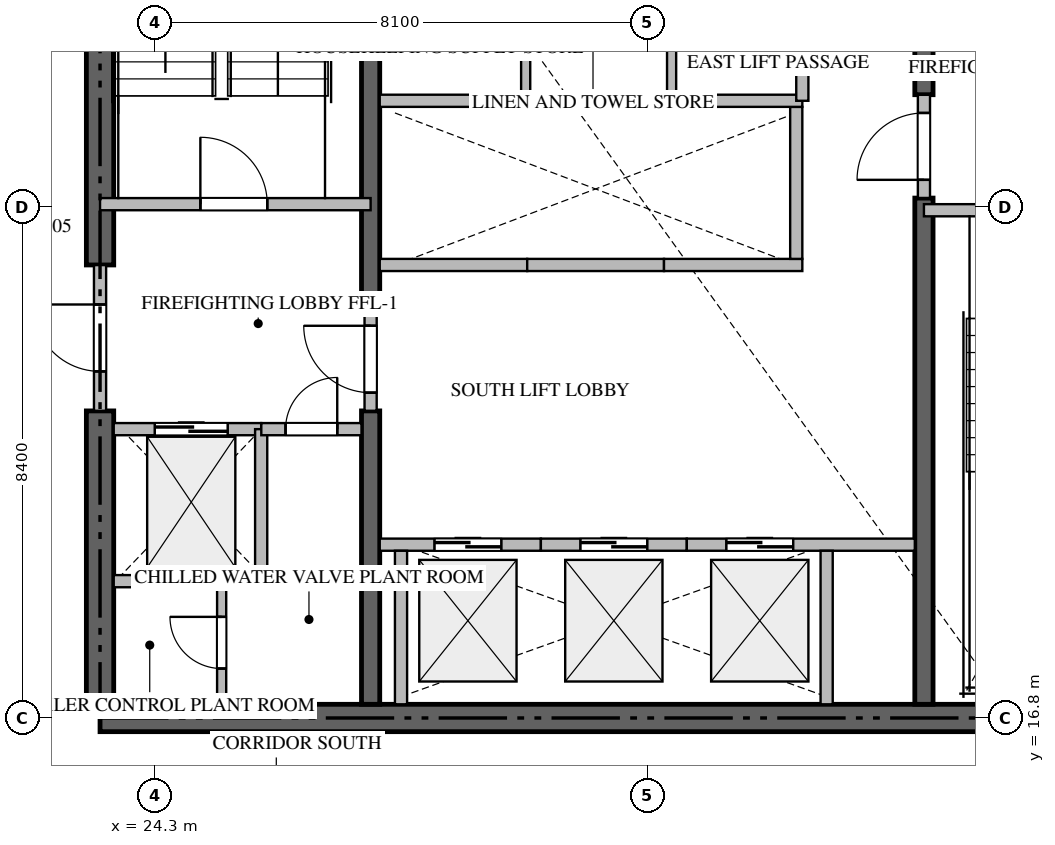
"""IFC4 building model, lengths in metres.
Left out: names, types, materials, properties, quantities, classifications, styles, units other than length and angle.
Written with IfcOpenShell. Run it as: python <this file> out.ifc"""

import sys

from ifc_helpers import new_model, si_unit, direction, frame, frame_2d, origin, place, context, subcontext, project, spatial, rectangle, extrude, source, transform, mapped, element, fill, save


model = new_model("IFC4")
c1 = context("Model", 3, precision=1e-05, world=origin(), true_north=direction((0.0, 1.0)))
c2 = subcontext(c1, "Body", "Model", "MODEL_VIEW")
j1 = project(units=[si_unit("LENGTHUNIT", "METRE"), si_unit("PLANEANGLEUNIT", "RADIAN")], contexts=[c1])
p1 = place(None, origin())
s1 = spatial("IfcSite", under=j1, at=p1, CompositionType="ELEMENT")
p2 = place(p1, origin())
s2 = spatial("IfcBuilding", under=s1, at=p2, CompositionType="ELEMENT")
p3 = place(p2, frame((0.0, 0.0, 41.7)))
s3 = spatial("IfcBuildingStorey", under=s2, at=p3, CompositionType="ELEMENT", Elevation=41.7)
p4 = place(p3, frame((23.4, 16.8, -0.26), z_axis=(0.0, 0.0, 1.0), x_axis=(1.0, 0.0, 0.0)))
e1 = element("IfcWall", 1, at=p4, inside=s3, PredefinedType="SHEAR", context=c2, shape_type="SweptSolid", body=[
    extrude(rectangle(XDim=18.0, YDim=0.45, at=frame_2d((9.0, 0.0))), origin(), (0.0, 0.0, 1.0), 3.748),
])
p5 = place(p3, frame((23.4, 17.025, -0.26), z_axis=(0.0, 0.0, 1.0), x_axis=(0.0, 1.0, 0.0)))
e2 = element("IfcWall", 2, at=p5, inside=s3, PredefinedType="SHEAR", context=c2, shape_type="SweptSolid", body=[
    extrude(rectangle(XDim=4.825, YDim=0.45, at=frame_2d((2.413, 0.0))), origin(), (0.0, 0.0, 1.0), 3.748),
])
p6 = place(p3, frame((23.4, 24.25, -0.26), z_axis=(0.0, 0.0, 1.0), x_axis=(0.0, 1.0, 0.0)))
e3 = element("IfcWall", 3, at=p6, inside=s3, PredefinedType="SHEAR", context=c2, shape_type="SweptSolid", body=[
    extrude(rectangle(XDim=9.125, YDim=0.45, at=frame_2d((4.562, 0.0))), origin(), (0.0, 0.0, 1.0), 3.748),
])
p7 = place(p3, frame((27.85, 17.025, -0.26), z_axis=(0.0, 0.0, 1.0), x_axis=(0.0, 1.0, 0.0)))
e4 = element("IfcWall", 4, at=p7, inside=s3, PredefinedType="SHEAR", context=c2, shape_type="SweptSolid", body=[
    extrude(rectangle(XDim=4.825, YDim=0.3, at=frame_2d((2.413, 0.0))), origin(), (0.0, 0.0, 1.0), 3.748),
])
p8 = place(p3, frame((27.85, 23.55, -0.26), z_axis=(0.0, 0.0, 1.0), x_axis=(0.0, 1.0, 0.0)))
e5 = element("IfcWall", 5, at=p8, inside=s3, PredefinedType="SHEAR", context=c2, shape_type="SweptSolid", body=[
    extrude(rectangle(XDim=9.825, YDim=0.3, at=frame_2d((4.913, 0.0))), origin(), (0.0, 0.0, 1.0), 3.748),
])
p9 = place(p3, frame((36.95, 17.025, -0.26), z_axis=(0.0, 0.0, 1.0), x_axis=(0.0, 1.0, 0.0)))
e6 = element("IfcWall", 6, at=p9, inside=s3, PredefinedType="SHEAR", context=c2, shape_type="SweptSolid", body=[
    extrude(rectangle(XDim=8.325, YDim=0.3, at=frame_2d((4.163, 0.0))), origin(), (0.0, 0.0, 1.0), 3.748),
])
p10 = place(p3, frame((36.95, 27.05, -0.26), z_axis=(0.0, 0.0, 1.0), x_axis=(0.0, 1.0, 0.0)))
e7 = element("IfcWall", 7, at=p10, inside=s3, PredefinedType="SHEAR", context=c2, shape_type="SweptSolid", body=[
    extrude(rectangle(XDim=6.325, YDim=0.3, at=frame_2d((3.163, 0.0))), origin(), (0.0, 0.0, 1.0), 3.748),
])
p11 = place(p3, frame((23.4, 25.25, 0.0), z_axis=(0.0, 0.0, 1.0), x_axis=(1.0, 0.0, 0.0)))
e8 = element("IfcWall", 8, at=p11, inside=s3, PredefinedType="STANDARD", context=c2, shape_type="SweptSolid", body=[
    extrude(rectangle(XDim=4.45, YDim=0.2, at=frame_2d((2.225, 0.0))), origin(), (0.0, 0.0, 1.0), 3.49),
])
p12 = place(p11, frame((1.65, 0.0, 0.0)))
e9 = element("IfcOpeningElement", 9, at=p12, cuts=e8, PredefinedType="OPENING", context=c2, shape_type="SweptSolid", body=[
    extrude(rectangle(XDim=1.1, YDim=2.15, at=frame_2d((0.55, 1.075))), frame((0.0, 0.11, 0.0), z_axis=(0.0, -1.0, 0.0), x_axis=(1.0, 0.0, 0.0)), (0.0, 0.0, 1.0), 0.22),
])
p13 = place(p3, frame((36.95, 25.15, 0.0), z_axis=(0.0, 0.0, 1.0), x_axis=(1.0, 0.0, 0.0)))
e10 = element("IfcWall", 10, at=p13, inside=s3, PredefinedType="STANDARD", context=c2, shape_type="SweptSolid", body=[
    extrude(rectangle(XDim=4.45, YDim=0.2, at=frame_2d((2.225, 0.0))), origin(), (0.0, 0.0, 1.0), 3.49),
])
p14 = place(p13, frame((1.65, 0.0, 0.0)))
e11 = element("IfcOpeningElement", 11, at=p14, cuts=e10, PredefinedType="OPENING", context=c2, shape_type="SweptSolid", body=[
    extrude(rectangle(XDim=1.1, YDim=2.15, at=frame_2d((0.55, 1.075))), frame((0.0, 0.11, 0.0), z_axis=(0.0, -1.0, 0.0), x_axis=(1.0, 0.0, 0.0)), (0.0, 0.0, 1.0), 0.22),
])
p15 = place(p3, frame((23.625, 21.55, 0.0), z_axis=(0.0, 0.0, 1.0), x_axis=(1.0, 0.0, 0.0)))
e12 = element("IfcWall", 12, at=p15, inside=s3, PredefinedType="STANDARD", context=c2, shape_type="SweptSolid", body=[
    extrude(rectangle(XDim=2.425, YDim=0.2, at=frame_2d((1.212, 0.0))), origin(), (0.0, 0.0, 1.0), 3.49),
])
p16 = place(p15, frame((0.675, 0.0, 0.0)))
e13 = element("IfcOpeningElement", 13, at=p16, cuts=e12, PredefinedType="OPENING", context=c2, shape_type="SweptSolid", body=[
    extrude(rectangle(XDim=1.2, YDim=2.2, at=frame_2d((0.6, 1.1))), frame((0.0, 0.11, 0.0), z_axis=(0.0, -1.0, 0.0), x_axis=(1.0, 0.0, 0.0)), (0.0, 0.0, 1.0), 0.22),
])
p17 = place(p3, frame((28.0, 19.65, 0.0), z_axis=(0.0, 0.0, 1.0), x_axis=(1.0, 0.0, 0.0)))
e14 = element("IfcWall", 14, at=p17, inside=s3, PredefinedType="STANDARD", context=c2, shape_type="SweptSolid", body=[
    extrude(rectangle(XDim=2.65, YDim=0.2, at=frame_2d((1.325, 0.0))), origin(), (0.0, 0.0, 1.0), 3.49),
])
p18 = place(p17, frame((0.9, 0.0, 0.0)))
e15 = element("IfcOpeningElement", 15, at=p18, cuts=e14, PredefinedType="OPENING", context=c2, shape_type="SweptSolid", body=[
    extrude(rectangle(XDim=1.1, YDim=2.2, at=frame_2d((0.55, 1.1))), frame((0.0, 0.11, 0.0), z_axis=(0.0, -1.0, 0.0), x_axis=(1.0, 0.0, 0.0)), (0.0, 0.0, 1.0), 0.22),
])
p19 = place(p3, frame((28.35, 17.025, 0.0), z_axis=(0.0, 0.0, 1.0), x_axis=(0.0, 1.0, 0.0)))
e16 = element("IfcWall", 16, at=p19, inside=s3, PredefinedType="STANDARD", context=c2, shape_type="SweptSolid", body=[
    extrude(rectangle(XDim=2.525, YDim=0.2, at=frame_2d((1.263, 0.0))), origin(), (0.0, 0.0, 1.0), 3.49),
])
p20 = place(p3, frame((30.65, 19.65, 0.0), z_axis=(0.0, 0.0, 1.0), x_axis=(1.0, 0.0, 0.0)))
e17 = element("IfcWall", 17, at=p20, inside=s3, PredefinedType="STANDARD", context=c2, shape_type="SweptSolid", body=[
    extrude(rectangle(XDim=2.4, YDim=0.2, at=frame_2d((1.2, 0.0))), origin(), (0.0, 0.0, 1.0), 3.49),
])
p21 = place(p20, frame((0.65, 0.0, 0.0)))
e18 = element("IfcOpeningElement", 18, at=p21, cuts=e17, PredefinedType="OPENING", context=c2, shape_type="SweptSolid", body=[
    extrude(rectangle(XDim=1.1, YDim=2.2, at=frame_2d((0.55, 1.1))), frame((0.0, 0.11, 0.0), z_axis=(0.0, -1.0, 0.0), x_axis=(1.0, 0.0, 0.0)), (0.0, 0.0, 1.0), 0.22),
])
p22 = place(p3, frame((33.05, 19.65, 0.0), z_axis=(0.0, 0.0, 1.0), x_axis=(1.0, 0.0, 0.0)))
e19 = element("IfcWall", 19, at=p22, inside=s3, PredefinedType="STANDARD", context=c2, shape_type="SweptSolid", body=[
    extrude(rectangle(XDim=3.75, YDim=0.2, at=frame_2d((1.875, 0.0))), origin(), (0.0, 0.0, 1.0), 3.49),
])
p23 = place(p22, frame((0.65, 0.0, 0.0)))
e20 = element("IfcOpeningElement", 20, at=p23, cuts=e19, PredefinedType="OPENING", context=c2, shape_type="SweptSolid", body=[
    extrude(rectangle(XDim=1.1, YDim=2.2, at=frame_2d((0.55, 1.1))), frame((0.0, 0.11, 0.0), z_axis=(0.0, -1.0, 0.0), x_axis=(1.0, 0.0, 0.0)), (0.0, 0.0, 1.0), 0.22),
])
p24 = place(p3, frame((35.35, 17.025, 0.0), z_axis=(0.0, 0.0, 1.0), x_axis=(0.0, 1.0, 0.0)))
e21 = element("IfcWall", 21, at=p24, inside=s3, PredefinedType="STANDARD", context=c2, shape_type="SweptSolid", body=[
    extrude(rectangle(XDim=2.525, YDim=0.2, at=frame_2d((1.263, 0.0))), origin(), (0.0, 0.0, 1.0), 3.49),
])
p25 = place(p3, frame((28.0, 24.25, 0.0), z_axis=(0.0, 0.0, 1.0), x_axis=(1.0, 0.0, 0.0)))
e22 = element("IfcWall", 22, at=p25, inside=s3, PredefinedType="STANDARD", context=c2, shape_type="SweptSolid", body=[
    extrude(rectangle(XDim=2.425, YDim=0.2, at=frame_2d((1.212, 0.0))), origin(), (0.0, 0.0, 1.0), 3.49),
])
p26 = place(p3, frame((30.425, 24.25, 0.0), z_axis=(0.0, 0.0, 1.0), x_axis=(1.0, 0.0, 0.0)))
e23 = element("IfcWall", 23, at=p26, inside=s3, PredefinedType="STANDARD", context=c2, shape_type="SweptSolid", body=[
    extrude(rectangle(XDim=2.25, YDim=0.2, at=frame_2d((1.125, 0.0))), origin(), (0.0, 0.0, 1.0), 3.49),
])
p27 = place(p3, frame((32.675, 24.25, 0.0), z_axis=(0.0, 0.0, 1.0), x_axis=(1.0, 0.0, 0.0)))
e24 = element("IfcWall", 24, at=p27, inside=s3, PredefinedType="STANDARD", context=c2, shape_type="SweptSolid", body=[
    extrude(rectangle(XDim=2.275, YDim=0.2, at=frame_2d((1.137, 0.0))), origin(), (0.0, 0.0, 1.0), 3.49),
])
for number, where, z_axis, x_axis in (
    (25, (34.85, 24.35, 0.0), (0.0, 0.0, 1.0), (0.0, 1.0, 0.0)),
    (26, (26.05, 19.05, 0.0), (0.0, 0.0, 1.0), (0.0, 1.0, 0.0)),
):
    element("IfcWall", number, at=place(p3, frame(where, z_axis=z_axis, x_axis=x_axis)), inside=s3, PredefinedType="STANDARD", context=c2, shape_type="SweptSolid", body=[
        extrude(rectangle(XDim=2.5, YDim=0.2, at=frame_2d((1.25, 0.0))), origin(), (0.0, 0.0, 1.0), 3.49),
    ])
p28 = place(p3, frame((23.625, 19.05, 0.0), z_axis=(0.0, 0.0, 1.0), x_axis=(1.0, 0.0, 0.0)))
e27 = element("IfcWall", 27, at=p28, inside=s3, PredefinedType="STANDARD", context=c2, shape_type="SweptSolid", body=[
    extrude(rectangle(XDim=2.425, YDim=0.2, at=frame_2d((1.212, 0.0))), origin(), (0.0, 0.0, 1.0), 3.49),
])
p29 = place(p3, frame((26.052, 21.55, 0.0), z_axis=(0.0, 0.0, 1.0), x_axis=(1.0, 0.0, 0.0)))
e28 = element("IfcWall", 28, at=p29, inside=s3, PredefinedType="STANDARD", context=c2, shape_type="SweptSolid", body=[
    extrude(rectangle(XDim=1.648, YDim=0.2, at=frame_2d((0.824, 0.0))), origin(), (0.0, 0.0, 1.0), 3.49),
])
p30 = place(p29, frame((0.399, 0.0, 0.0)))
e29 = element("IfcOpeningElement", 29, at=p30, cuts=e28, PredefinedType="OPENING", context=c2, shape_type="SweptSolid", body=[
    extrude(rectangle(XDim=0.85, YDim=2.1, at=frame_2d((0.425, 1.05))), frame((0.0, 0.11, 0.0), z_axis=(0.0, -1.0, 0.0), x_axis=(1.0, 0.0, 0.0)), (0.0, 0.0, 1.0), 0.22),
])
p31 = place(p3, frame((23.4, 21.852, 0.0), z_axis=(0.0, 0.0, 1.0), x_axis=(0.0, 1.0, 0.0)))
e30 = element("IfcWall", 30, at=p31, inside=s3, PredefinedType="STANDARD", context=c2, shape_type="SweptSolid", body=[
    extrude(rectangle(XDim=2.396, YDim=0.2, at=frame_2d((1.198, 0.0))), origin(), (0.0, 0.0, 1.0), 3.49),
])
p32 = place(p31, frame((0.648, 0.0, 0.0)))
e31 = element("IfcOpeningElement", 31, at=p32, cuts=e30, PredefinedType="OPENING", context=c2, shape_type="SweptSolid", body=[
    extrude(rectangle(XDim=1.1, YDim=2.15, at=frame_2d((0.55, 1.075))), frame((0.0, 0.11, 0.0), z_axis=(0.0, -1.0, 0.0), x_axis=(1.0, 0.0, 0.0)), (0.0, 0.0, 1.0), 0.22),
])
p33 = place(p3, frame((27.85, 21.852, 0.0), z_axis=(0.0, 0.0, 1.0), x_axis=(0.0, 1.0, 0.0)))
e32 = element("IfcWall", 32, at=p33, inside=s3, PredefinedType="STANDARD", context=c2, shape_type="SweptSolid", body=[
    extrude(rectangle(XDim=1.696, YDim=0.2, at=frame_2d((0.848, 0.0))), origin(), (0.0, 0.0, 1.0), 3.49),
])
p34 = place(p33, frame((0.298, 0.0, 0.0)))
e33 = element("IfcOpeningElement", 33, at=p34, cuts=e32, PredefinedType="OPENING", context=c2, shape_type="SweptSolid", body=[
    extrude(rectangle(XDim=1.1, YDim=2.15, at=frame_2d((0.55, 1.075))), frame((0.0, 0.11, 0.0), z_axis=(0.0, -1.0, 0.0), x_axis=(1.0, 0.0, 0.0)), (0.0, 0.0, 1.0), 0.22),
])
p35 = place(p3, frame((36.95, 25.352, 0.0), z_axis=(0.0, 0.0, 1.0), x_axis=(0.0, 1.0, 0.0)))
e34 = element("IfcWall", 34, at=p35, inside=s3, PredefinedType="STANDARD", context=c2, shape_type="SweptSolid", body=[
    extrude(rectangle(XDim=1.696, YDim=0.2, at=frame_2d((0.848, 0.0))), origin(), (0.0, 0.0, 1.0), 3.49),
])
p36 = place(p35, frame((0.298, 0.0, 0.0)))
e35 = element("IfcOpeningElement", 35, at=p36, cuts=e34, PredefinedType="OPENING", context=c2, shape_type="SweptSolid", body=[
    extrude(rectangle(XDim=1.1, YDim=2.15, at=frame_2d((0.55, 1.075))), frame((0.0, 0.11, 0.0), z_axis=(0.0, -1.0, 0.0), x_axis=(1.0, 0.0, 0.0)), (0.0, 0.0, 1.0), 0.22),
])
p37 = place(p3, frame((28.0, 26.95, 0.0), z_axis=(0.0, 0.0, 1.0), x_axis=(1.0, 0.0, 0.0)))
e36 = element("IfcWall", 36, at=p37, inside=s3, PredefinedType="STANDARD", context=c2, shape_type="SweptSolid", body=[
    extrude(rectangle(XDim=6.95, YDim=0.2, at=frame_2d((3.475, 0.0))), origin(), (0.0, 0.0, 1.0), 3.49),
])
p38 = place(p3, frame((25.4, 17.025, 0.0), z_axis=(0.0, 0.0, 1.0), x_axis=(0.0, 1.0, 0.0)))
e37 = element("IfcWall", 37, at=p38, inside=s3, PredefinedType="PARTITIONING", context=c2, shape_type="SweptSolid", body=[
    extrude(rectangle(XDim=2.025, YDim=0.15, at=frame_2d((1.013, 0.0))), origin(), (0.0, 0.0, 1.0), 3.49),
])
p39 = place(p38, frame((0.588, 0.0, 0.0)))
e38 = element("IfcOpeningElement", 38, at=p39, cuts=e37, PredefinedType="OPENING", context=c2, shape_type="SweptSolid", body=[
    extrude(rectangle(XDim=0.85, YDim=2.1, at=frame_2d((0.425, 1.05))), frame((0.0, 0.085, 0.0), z_axis=(0.0, -1.0, 0.0), x_axis=(1.0, 0.0, 0.0)), (0.0, 0.0, 1.0), 0.17),
])
p40 = place(p3, frame((34.95, 26.95, 0.0), z_axis=(0.0, 0.0, 1.0), x_axis=(0.0, 1.0, 0.0)))
e39 = element("IfcWall", 39, at=p40, inside=s3, PredefinedType="STANDARD", context=c2, shape_type="SweptSolid", body=[
    extrude(rectangle(XDim=3.6, YDim=0.2, at=frame_2d((1.8, 0.0))), origin(), (0.0, 0.0, 1.0), 3.49),
])
p41 = place(p40, frame((1.35, 0.0, 0.0)))
e40 = element("IfcOpeningElement", 40, at=p41, cuts=e39, PredefinedType="OPENING", context=c2, shape_type="SweptSolid", body=[
    extrude(rectangle(XDim=0.9, YDim=2.1, at=frame_2d((0.45, 1.05))), frame((0.0, 0.11, 0.0), z_axis=(0.0, -1.0, 0.0), x_axis=(1.0, 0.0, 0.0)), (0.0, 0.0, 1.0), 0.22),
])
p42 = place(p3, frame((32.8, 26.95, 0.0), z_axis=(0.0, 0.0, 1.0), x_axis=(0.0, 1.0, 0.0)))
e41 = element("IfcWall", 41, at=p42, inside=s3, PredefinedType="PARTITIONING", context=c2, shape_type="SweptSolid", body=[
    extrude(rectangle(XDim=3.6, YDim=0.15, at=frame_2d((1.8, 0.0))), origin(), (0.0, 0.0, 1.0), 3.49),
])
p43 = place(p42, frame((1.375, 0.0, 0.0)))
e42 = element("IfcOpeningElement", 42, at=p43, cuts=e41, PredefinedType="OPENING", context=c2, shape_type="SweptSolid", body=[
    extrude(rectangle(XDim=0.85, YDim=2.1, at=frame_2d((0.425, 1.05))), frame((0.0, 0.085, 0.0), z_axis=(0.0, -1.0, 0.0), x_axis=(1.0, 0.0, 0.0)), (0.0, 0.0, 1.0), 0.17),
])
p44 = place(p3, frame((30.4, 26.95, 0.0), z_axis=(0.0, 0.0, 1.0), x_axis=(0.0, 1.0, 0.0)))
e43 = element("IfcWall", 43, at=p44, inside=s3, PredefinedType="PARTITIONING", context=c2, shape_type="SweptSolid", body=[
    extrude(rectangle(XDim=3.6, YDim=0.15, at=frame_2d((1.8, 0.0))), origin(), (0.0, 0.0, 1.0), 3.49),
])
p45 = place(p44, frame((1.375, 0.0, 0.0)))
e44 = element("IfcOpeningElement", 44, at=p45, cuts=e43, PredefinedType="OPENING", context=c2, shape_type="SweptSolid", body=[
    extrude(rectangle(XDim=0.85, YDim=2.1, at=frame_2d((0.425, 1.05))), frame((0.0, 0.085, 0.0), z_axis=(0.0, -1.0, 0.0), x_axis=(1.0, 0.0, 0.0)), (0.0, 0.0, 1.0), 0.17),
])
m1 = source(origin(), c2, "Body", "SweptSolid", [
    extrude(rectangle(XDim=1.1, YDim=2.15, at=frame_2d((0.55, 1.075))), frame((0.0, 0.025, 0.0), z_axis=(0.0, -1.0, 0.0), x_axis=(1.0, 0.0, 0.0)), (0.0, 0.0, 1.0), 0.05),
])
p46 = place(p12, origin())
e45 = element("IfcDoor", 45, at=p46, inside=s3, OperationType="SINGLE_SWING_LEFT", PredefinedType="DOOR", context=c2, shape_type="MappedRepresentation", body=[
    mapped(m1, transform((0.0, 0.0, 0.0), scale=1.0)),
])
fill(e9, e45)
m2 = source(origin(), c2, "Body", "SweptSolid", [
    extrude(rectangle(XDim=1.2, YDim=2.2, at=frame_2d((0.6, 1.1))), frame((0.0, 0.025, 0.0), z_axis=(0.0, -1.0, 0.0), x_axis=(1.0, 0.0, 0.0)), (0.0, 0.0, 1.0), 0.05),
])
p47 = place(p16, origin())
e46 = element("IfcDoor", 46, at=p47, inside=s3, OperationType="DOUBLE_DOOR_SLIDING", PredefinedType="DOOR", context=c2, shape_type="MappedRepresentation", body=[
    mapped(m2, transform((0.0, 0.0, 0.0), scale=1.0)),
])
fill(e13, e46)
m3 = source(origin(), c2, "Body", "SweptSolid", [
    extrude(rectangle(XDim=1.1, YDim=2.2, at=frame_2d((0.55, 1.1))), frame((0.0, 0.025, 0.0), z_axis=(0.0, -1.0, 0.0), x_axis=(1.0, 0.0, 0.0)), (0.0, 0.0, 1.0), 0.05),
])
p48 = place(p18, origin())
e47 = element("IfcDoor", 47, at=p48, inside=s3, OperationType="DOUBLE_DOOR_SLIDING", PredefinedType="DOOR", context=c2, shape_type="MappedRepresentation", body=[
    mapped(m3, transform((0.0, 0.0, 0.0), scale=1.0)),
])
fill(e15, e47)
p49 = place(p21, origin())
e48 = element("IfcDoor", 48, at=p49, inside=s3, OperationType="DOUBLE_DOOR_SLIDING", PredefinedType="DOOR", context=c2, shape_type="MappedRepresentation", body=[
    mapped(m3, transform((0.0, 0.0, 0.0), scale=1.0)),
])
fill(e18, e48)
p50 = place(p23, origin())
e49 = element("IfcDoor", 49, at=p50, inside=s3, OperationType="DOUBLE_DOOR_SLIDING", PredefinedType="DOOR", context=c2, shape_type="MappedRepresentation", body=[
    mapped(m3, transform((0.0, 0.0, 0.0), scale=1.0)),
])
fill(e20, e49)
m4 = source(origin(), c2, "Body", "SweptSolid", [
    extrude(rectangle(XDim=0.85, YDim=2.1, at=frame_2d((0.425, 1.05))), frame((0.0, 0.025, 0.0), z_axis=(0.0, -1.0, 0.0), x_axis=(1.0, 0.0, 0.0)), (0.0, 0.0, 1.0), 0.05),
])
p51 = place(p30, origin())
e50 = element("IfcDoor", 50, at=p51, inside=s3, OperationType="SINGLE_SWING_RIGHT", PredefinedType="DOOR", context=c2, shape_type="MappedRepresentation", body=[
    mapped(m4, transform((0.0, 0.0, 0.0), scale=1.0)),
])
fill(e29, e50)
p52 = place(p32, origin())
e51 = element("IfcDoor", 51, at=p52, inside=s3, OperationType="SINGLE_SWING_RIGHT", PredefinedType="DOOR", context=c2, shape_type="MappedRepresentation", body=[
    mapped(m1, transform((0.0, 0.0, 0.0), scale=1.0)),
])
fill(e31, e51)
p53 = place(p34, origin())
e52 = element("IfcDoor", 52, at=p53, inside=s3, OperationType="SINGLE_SWING_RIGHT", PredefinedType="DOOR", context=c2, shape_type="MappedRepresentation", body=[
    mapped(m1, transform((0.0, 0.0, 0.0), scale=1.0)),
])
fill(e33, e52)
p54 = place(p36, origin())
e53 = element("IfcDoor", 53, at=p54, inside=s3, OperationType="SINGLE_SWING_LEFT", PredefinedType="DOOR", context=c2, shape_type="MappedRepresentation", body=[
    mapped(m1, transform((0.0, 0.0, 0.0), scale=1.0)),
])
fill(e35, e53)
p55 = place(p39, origin())
e54 = element("IfcDoor", 54, at=p55, inside=s3, OperationType="SINGLE_SWING_RIGHT", PredefinedType="DOOR", context=c2, shape_type="MappedRepresentation", body=[
    mapped(m4, transform((0.0, 0.0, 0.0), scale=1.0)),
])
fill(e38, e54)
save(model, sys.argv[1])
